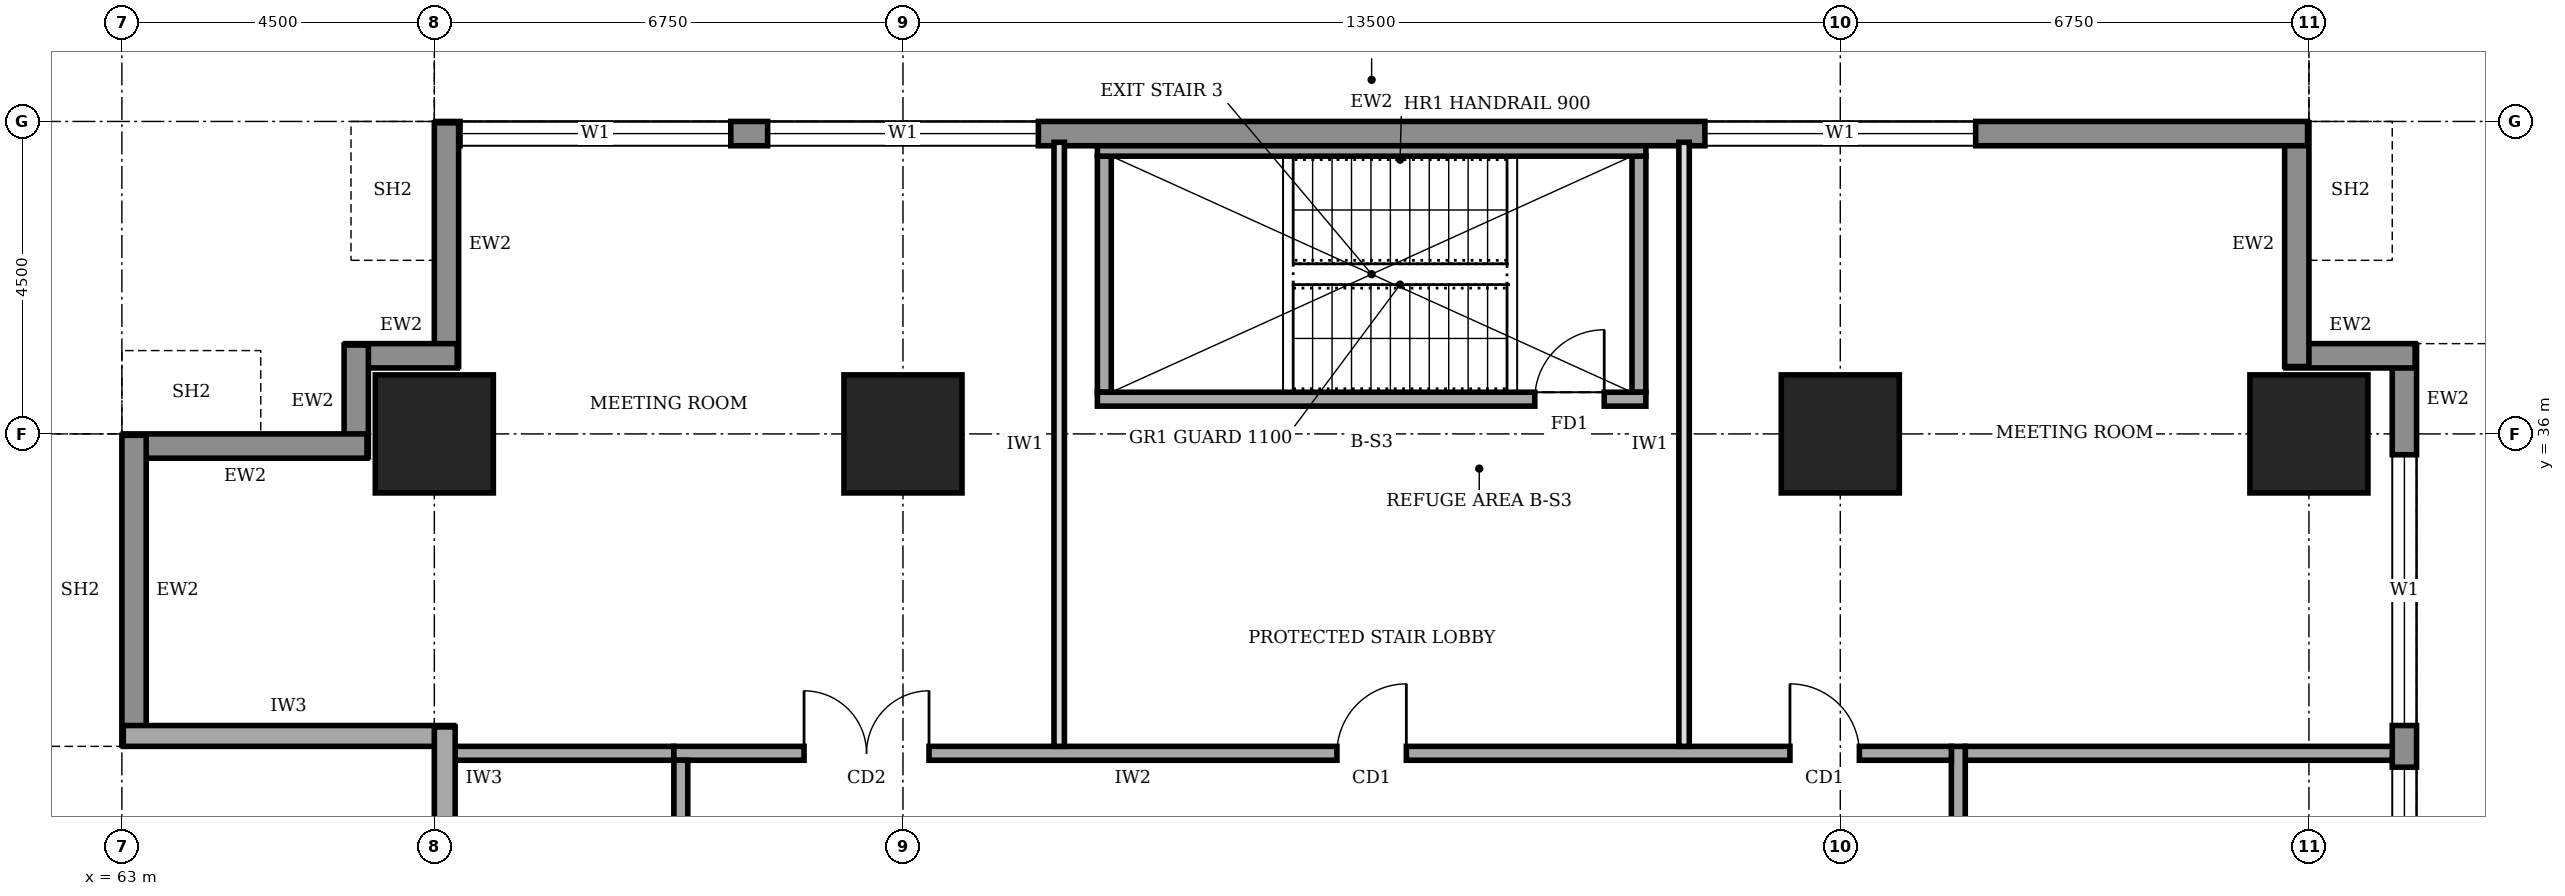
"""IFC4 building model, lengths in metres.
Left out: names, types, materials, properties, quantities, classifications, styles, units other than length and angle.
Written with IfcOpenShell. Run it as: python <this file> out.ifc"""

import sys

from ifc_helpers import new_model, si_unit, direction, frame, frame_2d, origin, origin_2d, place, context, subcontext, project, spatial, rectangle, extrude, element, fill, save


model = new_model("IFC4")
c1 = context("Model", 3, precision=1e-05, world=origin(), true_north=direction((0.0, 1.0)))
c2 = subcontext(c1, "Body", "Model", "MODEL_VIEW")
j1 = project(units=[si_unit("LENGTHUNIT", "METRE"), si_unit("PLANEANGLEUNIT", "RADIAN")], contexts=[c1])
p1 = place(None, origin())
s1 = spatial("IfcSite", under=j1, at=p1, CompositionType="ELEMENT")
p2 = place(p1, origin())
s2 = spatial("IfcBuilding", under=s1, at=p2, CompositionType="ELEMENT")
p3 = place(p2, frame((0.0, 0.0, 117.0)))
s3 = spatial("IfcBuildingStorey", under=s2, at=p3, CompositionType="ELEMENT", Elevation=117.0)
for number, where, z_axis, x_axis in (
    (1, (67.5, 36.0, 0.0), (0.0, 0.0, 1.0), (1.0, 0.0, 0.0)),
    (2, (74.25, 36.0, 0.0), (0.0, 0.0, 1.0), (1.0, 0.0, 0.0)),
    (3, (87.75, 36.0, 0.0), (0.0, 0.0, 1.0), (1.0, 0.0, 0.0)),
    (4, (94.5, 36.0, 0.0), (0.0, 0.0, 1.0), (1.0, 0.0, 0.0)),
):
    element("IfcColumn", number, at=place(p3, frame(where, z_axis=z_axis, x_axis=x_axis)), inside=s3, PredefinedType="COLUMN", context=c2, shape_type="SweptSolid", body=[
        extrude(rectangle(XDim=1.7, YDim=1.7, at=origin_2d()), origin(), (0.0, 0.0, 1.0), 4.0),
    ])
p4 = place(p3, frame((95.875, 3.32, 0.0), z_axis=(0.0, 0.0, 1.0), x_axis=(0.0, 1.0, 0.0)))
e5 = element("IfcWall", 5, at=p4, inside=s3, PredefinedType="STANDARD", context=c2, shape_type="SweptSolid", body=[
    extrude(rectangle(XDim=33.96, YDim=0.35, at=frame_2d((16.98, 0.0))), origin(), (0.0, 0.0, 1.0), 3.75),
])
p5 = place(p4, frame((1.48, 0.0, 0.9)))
e6 = element("IfcOpeningElement", 6, at=p5, cuts=e5, PredefinedType="OPENING", context=c2, shape_type="SweptSolid", body=[
    extrude(rectangle(XDim=3.9, YDim=2.2, at=frame_2d((1.95, 1.1))), frame((0.0, 0.185, 0.0), z_axis=(0.0, -1.0, 0.0), x_axis=(1.0, 0.0, 0.0)), (0.0, 0.0, 1.0), 0.37),
])
p6 = place(p4, frame((5.98, 0.0, 0.9)))
e7 = element("IfcOpeningElement", 7, at=p6, cuts=e5, PredefinedType="OPENING", context=c2, shape_type="SweptSolid", body=[
    extrude(rectangle(XDim=3.9, YDim=2.2, at=frame_2d((1.95, 1.1))), frame((0.0, 0.185, 0.0), z_axis=(0.0, -1.0, 0.0), x_axis=(1.0, 0.0, 0.0)), (0.0, 0.0, 1.0), 0.37),
])
p7 = place(p4, frame((10.48, 0.0, 0.9)))
e8 = element("IfcOpeningElement", 8, at=p7, cuts=e5, PredefinedType="OPENING", context=c2, shape_type="SweptSolid", body=[
    extrude(rectangle(XDim=3.9, YDim=2.2, at=frame_2d((1.95, 1.1))), frame((0.0, 0.185, 0.0), z_axis=(0.0, -1.0, 0.0), x_axis=(1.0, 0.0, 0.0)), (0.0, 0.0, 1.0), 0.37),
])
p8 = place(p4, frame((14.98, 0.0, 0.9)))
e9 = element("IfcOpeningElement", 9, at=p8, cuts=e5, PredefinedType="OPENING", context=c2, shape_type="SweptSolid", body=[
    extrude(rectangle(XDim=3.9, YDim=2.2, at=frame_2d((1.95, 1.1))), frame((0.0, 0.185, 0.0), z_axis=(0.0, -1.0, 0.0), x_axis=(1.0, 0.0, 0.0)), (0.0, 0.0, 1.0), 0.37),
])
p9 = place(p4, frame((19.48, 0.0, 0.9)))
e10 = element("IfcOpeningElement", 10, at=p9, cuts=e5, PredefinedType="OPENING", context=c2, shape_type="SweptSolid", body=[
    extrude(rectangle(XDim=3.9, YDim=2.2, at=frame_2d((1.95, 1.1))), frame((0.0, 0.185, 0.0), z_axis=(0.0, -1.0, 0.0), x_axis=(1.0, 0.0, 0.0)), (0.0, 0.0, 1.0), 0.37),
])
p10 = place(p4, frame((23.98, 0.0, 0.9)))
e11 = element("IfcOpeningElement", 11, at=p10, cuts=e5, PredefinedType="OPENING", context=c2, shape_type="SweptSolid", body=[
    extrude(rectangle(XDim=3.9, YDim=2.2, at=frame_2d((1.95, 1.1))), frame((0.0, 0.185, 0.0), z_axis=(0.0, -1.0, 0.0), x_axis=(1.0, 0.0, 0.0)), (0.0, 0.0, 1.0), 0.37),
])
p11 = place(p4, frame((28.48, 0.0, 0.9)))
e12 = element("IfcOpeningElement", 12, at=p11, cuts=e5, PredefinedType="OPENING", context=c2, shape_type="SweptSolid", body=[
    extrude(rectangle(XDim=3.9, YDim=2.2, at=frame_2d((1.95, 1.1))), frame((0.0, 0.185, 0.0), z_axis=(0.0, -1.0, 0.0), x_axis=(1.0, 0.0, 0.0)), (0.0, 0.0, 1.0), 0.37),
])
p12 = place(p3, frame((96.03, 37.125, 0.0), z_axis=(0.0, 0.0, 1.0), x_axis=(-1.0, 0.0, 0.0)))
e13 = element("IfcWall", 13, at=p12, inside=s3, PredefinedType="STANDARD", context=c2, shape_type="SweptSolid", body=[
    extrude(rectangle(XDim=1.86, YDim=0.35, at=frame_2d((0.93, 0.0))), origin(), (0.0, 0.0, 1.0), 3.75),
])
p13 = place(p3, frame((94.325, 36.97, 0.0), z_axis=(0.0, 0.0, 1.0), x_axis=(0.0, 1.0, 0.0)))
e14 = element("IfcWall", 14, at=p13, inside=s3, PredefinedType="STANDARD", context=c2, shape_type="SweptSolid", body=[
    extrude(rectangle(XDim=3.51, YDim=0.35, at=frame_2d((1.755, 0.0))), origin(), (0.0, 0.0, 1.0), 2.85),
])
p14 = place(p3, frame((94.48, 40.325, 0.0), z_axis=(0.0, 0.0, 1.0), x_axis=(-1.0, 0.0, 0.0)))
e15 = element("IfcWall", 15, at=p14, inside=s3, PredefinedType="STANDARD", context=c2, shape_type="SweptSolid", body=[
    extrude(rectangle(XDim=26.96, YDim=0.35, at=frame_2d((13.48, 0.0))), origin(), (0.0, 0.0, 1.0), 3.75),
])
p15 = place(p14, frame((22.71, 0.0, 0.9)))
e16 = element("IfcOpeningElement", 16, at=p15, cuts=e15, PredefinedType="OPENING", context=c2, shape_type="SweptSolid", body=[
    extrude(rectangle(XDim=3.9, YDim=2.2, at=frame_2d((1.95, 1.1))), frame((0.0, 0.185, 0.0), z_axis=(0.0, -1.0, 0.0), x_axis=(1.0, 0.0, 0.0)), (0.0, 0.0, 1.0), 0.37),
])
p16 = place(p14, frame((18.28, 0.0, 0.9)))
e17 = element("IfcOpeningElement", 17, at=p16, cuts=e15, PredefinedType="OPENING", context=c2, shape_type="SweptSolid", body=[
    extrude(rectangle(XDim=3.9, YDim=2.2, at=frame_2d((1.95, 1.1))), frame((0.0, 0.185, 0.0), z_axis=(0.0, -1.0, 0.0), x_axis=(1.0, 0.0, 0.0)), (0.0, 0.0, 1.0), 0.37),
])
p17 = place(p14, frame((4.78, 0.0, 0.9)))
e18 = element("IfcOpeningElement", 18, at=p17, cuts=e15, PredefinedType="OPENING", context=c2, shape_type="SweptSolid", body=[
    extrude(rectangle(XDim=3.9, YDim=2.2, at=frame_2d((1.95, 1.1))), frame((0.0, 0.185, 0.0), z_axis=(0.0, -1.0, 0.0), x_axis=(1.0, 0.0, 0.0)), (0.0, 0.0, 1.0), 0.37),
])
p18 = place(p3, frame((67.675, 40.48, 0.0), z_axis=(0.0, 0.0, 1.0), x_axis=(0.0, -1.0, 0.0)))
e19 = element("IfcWall", 19, at=p18, inside=s3, PredefinedType="STANDARD", context=c2, shape_type="SweptSolid", body=[
    extrude(rectangle(XDim=3.51, YDim=0.35, at=frame_2d((1.755, 0.0))), origin(), (0.0, 0.0, 1.0), 2.85),
])
for number, where, z_axis, x_axis in (
    (20, (67.83, 37.125, 0.0), (0.0, 0.0, 1.0), (-1.0, 0.0, 0.0)),
    (21, (66.375, 37.28, 0.0), (0.0, 0.0, 1.0), (0.0, -1.0, 0.0)),
):
    element("IfcWall", number, at=place(p3, frame(where, z_axis=z_axis, x_axis=x_axis)), inside=s3, PredefinedType="STANDARD", context=c2, shape_type="SweptSolid", body=[
        extrude(rectangle(XDim=1.61, YDim=0.35, at=frame_2d((0.805, 0.0))), origin(), (0.0, 0.0, 1.0), 3.75),
    ])
p19 = place(p3, frame((66.53, 35.825, 0.0), z_axis=(0.0, 0.0, 1.0), x_axis=(-1.0, 0.0, 0.0)))
e22 = element("IfcWall", 22, at=p19, inside=s3, PredefinedType="STANDARD", context=c2, shape_type="SweptSolid", body=[
    extrude(rectangle(XDim=3.51, YDim=0.35, at=frame_2d((1.755, 0.0))), origin(), (0.0, 0.0, 1.0), 2.85),
])
p20 = place(p3, frame((63.175, 35.98, 0.0), z_axis=(0.0, 0.0, 1.0), x_axis=(0.0, -1.0, 0.0)))
e23 = element("IfcWall", 23, at=p20, inside=s3, PredefinedType="STANDARD", context=c2, shape_type="SweptSolid", body=[
    extrude(rectangle(XDim=4.46, YDim=0.35, at=frame_2d((2.23, 0.0))), origin(), (0.0, 0.0, 1.0), 3.75),
])
p21 = place(p3, frame((63.02, 31.65, 0.0), z_axis=(0.0, 0.0, 1.0), x_axis=(1.0, 0.0, 0.0)))
e24 = element("IfcWall", 24, at=p21, inside=s3, PredefinedType="SOLIDWALL", context=c2, shape_type="SweptSolid", body=[
    extrude(rectangle(XDim=4.76, YDim=0.3, at=frame_2d((2.38, 0.0))), origin(), (0.0, 0.0, 1.0), 3.75),
])
p22 = place(p3, frame((67.65, 31.78, 0.0), z_axis=(0.0, 0.0, 1.0), x_axis=(0.0, -1.0, 0.0)))
e25 = element("IfcWall", 25, at=p22, inside=s3, PredefinedType="SOLIDWALL", context=c2, shape_type="SweptSolid", body=[
    extrude(rectangle(XDim=1.48, YDim=0.3, at=frame_2d((0.74, 0.0))), origin(), (0.0, 0.0, 1.0), 2.65),
])
p23 = place(p3, frame((89.45, 9.2, 0.0), z_axis=(0.0, 0.0, 1.0), x_axis=(0.0, 1.0, 0.0)))
e26 = element("IfcWall", 26, at=p23, inside=s3, PredefinedType="SOLIDWALL", context=c2, shape_type="SweptSolid", body=[
    extrude(rectangle(XDim=22.3, YDim=0.2, at=frame_2d((11.15, 0.0))), origin(), (0.0, 0.0, 1.0), 3.75),
])
p24 = place(p23, frame((1.625, 0.0, 0.0)))
e27 = element("IfcOpeningElement", 27, at=p24, cuts=e26, PredefinedType="OPENING", context=c2, shape_type="SweptSolid", body=[
    extrude(rectangle(XDim=1.0, YDim=2.1, at=frame_2d((0.5, 1.05))), frame((0.0, 0.11, 0.0), z_axis=(0.0, -1.0, 0.0), x_axis=(1.0, 0.0, 0.0)), (0.0, 0.0, 1.0), 0.22),
])
p25 = place(p23, frame((5.05, 0.0, 0.0)))
e28 = element("IfcOpeningElement", 28, at=p25, cuts=e26, PredefinedType="OPENING", context=c2, shape_type="SweptSolid", body=[
    extrude(rectangle(XDim=1.0, YDim=2.1, at=frame_2d((0.5, 1.05))), frame((0.0, 0.11, 0.0), z_axis=(0.0, -1.0, 0.0), x_axis=(1.0, 0.0, 0.0)), (0.0, 0.0, 1.0), 0.22),
])
p26 = place(p23, frame((8.075, 0.0, 0.0)))
e29 = element("IfcOpeningElement", 29, at=p26, cuts=e26, PredefinedType="OPENING", context=c2, shape_type="SweptSolid", body=[
    extrude(rectangle(XDim=0.9, YDim=2.1, at=frame_2d((0.45, 1.05))), frame((0.0, 0.11, 0.0), z_axis=(0.0, -1.0, 0.0), x_axis=(1.0, 0.0, 0.0)), (0.0, 0.0, 1.0), 0.22),
])
p27 = place(p23, frame((11.05, 0.0, 0.0)))
e30 = element("IfcOpeningElement", 30, at=p27, cuts=e26, PredefinedType="OPENING", context=c2, shape_type="SweptSolid", body=[
    extrude(rectangle(XDim=0.9, YDim=2.1, at=frame_2d((0.45, 1.05))), frame((0.0, 0.11, 0.0), z_axis=(0.0, -1.0, 0.0), x_axis=(1.0, 0.0, 0.0)), (0.0, 0.0, 1.0), 0.22),
])
p28 = place(p23, frame((15.675, 0.0, 0.0)))
e31 = element("IfcOpeningElement", 31, at=p28, cuts=e26, PredefinedType="OPENING", context=c2, shape_type="SweptSolid", body=[
    extrude(rectangle(XDim=0.9, YDim=2.1, at=frame_2d((0.45, 1.05))), frame((0.0, 0.11, 0.0), z_axis=(0.0, -1.0, 0.0), x_axis=(1.0, 0.0, 0.0)), (0.0, 0.0, 1.0), 0.22),
])
p29 = place(p23, frame((13.1, 0.0, 0.0)))
e32 = element("IfcOpeningElement", 32, at=p29, cuts=e26, PredefinedType="OPENING", context=c2, shape_type="SweptSolid", body=[
    extrude(rectangle(XDim=1.0, YDim=2.1, at=frame_2d((0.5, 1.05))), frame((0.0, 0.11, 0.0), z_axis=(0.0, -1.0, 0.0), x_axis=(1.0, 0.0, 0.0)), (0.0, 0.0, 1.0), 0.22),
])
p30 = place(p23, frame((19.475, 0.0, 0.0)))
e33 = element("IfcOpeningElement", 33, at=p30, cuts=e26, PredefinedType="OPENING", context=c2, shape_type="SweptSolid", body=[
    extrude(rectangle(XDim=1.0, YDim=2.1, at=frame_2d((0.5, 1.05))), frame((0.0, 0.11, 0.0), z_axis=(0.0, -1.0, 0.0), x_axis=(1.0, 0.0, 0.0)), (0.0, 0.0, 1.0), 0.22),
])
p31 = place(p3, frame((89.35, 31.4, 0.0), z_axis=(0.0, 0.0, 1.0), x_axis=(-1.0, 0.0, 0.0)))
e34 = element("IfcWall", 34, at=p31, inside=s3, PredefinedType="SOLIDWALL", context=c2, shape_type="SweptSolid", body=[
    extrude(rectangle(XDim=18.4, YDim=0.2, at=frame_2d((9.2, 0.0))), origin(), (0.0, 0.0, 1.0), 3.75),
])
p32 = place(p31, frame((14.725, 0.0, 0.0)))
e35 = element("IfcOpeningElement", 35, at=p32, cuts=e34, PredefinedType="OPENING", context=c2, shape_type="SweptSolid", body=[
    extrude(rectangle(XDim=1.8, YDim=2.1, at=frame_2d((0.9, 1.05))), frame((0.0, 0.11, 0.0), z_axis=(0.0, -1.0, 0.0), x_axis=(1.0, 0.0, 0.0)), (0.0, 0.0, 1.0), 0.22),
])
p33 = place(p31, frame((7.85, 0.0, 0.0)))
e36 = element("IfcOpeningElement", 36, at=p33, cuts=e34, PredefinedType="OPENING", context=c2, shape_type="SweptSolid", body=[
    extrude(rectangle(XDim=1.0, YDim=2.1, at=frame_2d((0.5, 1.05))), frame((0.0, 0.11, 0.0), z_axis=(0.0, -1.0, 0.0), x_axis=(1.0, 0.0, 0.0)), (0.0, 0.0, 1.0), 0.22),
])
p34 = place(p31, frame((1.325, 0.0, 0.0)))
e37 = element("IfcOpeningElement", 37, at=p34, cuts=e34, PredefinedType="OPENING", context=c2, shape_type="SweptSolid", body=[
    extrude(rectangle(XDim=1.0, YDim=2.1, at=frame_2d((0.5, 1.05))), frame((0.0, 0.11, 0.0), z_axis=(0.0, -1.0, 0.0), x_axis=(1.0, 0.0, 0.0)), (0.0, 0.0, 1.0), 0.22),
])
p35 = place(p3, frame((71.05, 31.3, 0.0), z_axis=(0.0, 0.0, 1.0), x_axis=(0.0, -1.0, 0.0)))
e38 = element("IfcWall", 38, at=p35, inside=s3, PredefinedType="SOLIDWALL", context=c2, shape_type="SweptSolid", body=[
    extrude(rectangle(XDim=22.3, YDim=0.2, at=frame_2d((11.15, 0.0))), origin(), (0.0, 0.0, 1.0), 3.75),
])
p36 = place(p35, frame((10.15, 0.0, 0.0)))
e39 = element("IfcOpeningElement", 39, at=p36, cuts=e38, PredefinedType="OPENING", context=c2, shape_type="SweptSolid", body=[
    extrude(rectangle(XDim=1.8, YDim=2.1, at=frame_2d((0.9, 1.05))), frame((0.0, 0.11, 0.0), z_axis=(0.0, -1.0, 0.0), x_axis=(1.0, 0.0, 0.0)), (0.0, 0.0, 1.0), 0.22),
])
p37 = place(p3, frame((67.8, 31.4, 0.0), z_axis=(0.0, 0.0, 1.0), x_axis=(1.0, 0.0, 0.0)))
e40 = element("IfcWall", 40, at=p37, inside=s3, PredefinedType="SOLIDWALL", context=c2, shape_type="SweptSolid", body=[
    extrude(rectangle(XDim=3.15, YDim=0.2, at=frame_2d((1.575, 0.0))), origin(), (0.0, 0.0, 1.0), 3.75),
])
p38 = place(p3, frame((89.55, 31.4, 0.0), z_axis=(0.0, 0.0, 1.0), x_axis=(1.0, 0.0, 0.0)))
e41 = element("IfcWall", 41, at=p38, inside=s3, PredefinedType="SOLIDWALL", context=c2, shape_type="SweptSolid", body=[
    extrude(rectangle(XDim=6.2, YDim=0.2, at=frame_2d((3.1, 0.0))), origin(), (0.0, 0.0, 1.0), 3.75),
])
for number, where, z_axis, x_axis in (
    (42, (76.5, 31.5, 0.0), (0.0, 0.0, 1.0), (0.0, 1.0, 0.0)),
    (43, (85.5, 31.5, 0.0), (0.0, 0.0, 1.0), (0.0, 1.0, 0.0)),
):
    element("IfcWall", number, at=place(p3, frame(where, z_axis=z_axis, x_axis=x_axis)), inside=s3, PredefinedType="PARTITIONING", context=c2, shape_type="SweptSolid", body=[
        extrude(rectangle(XDim=8.7, YDim=0.15, at=frame_2d((4.35, 0.0))), origin(), (0.0, 0.0, 1.0), 3.75),
    ])
p39 = place(p3, frame((77.05, 36.5, 0.0), z_axis=(0.0, 0.0, 1.0), x_axis=(1.0, 0.0, 0.0)))
e44 = element("IfcWall", 44, at=p39, inside=s3, PredefinedType="SOLIDWALL", context=c2, shape_type="SweptSolid", body=[
    extrude(rectangle(XDim=7.9, YDim=0.2, at=frame_2d((3.95, 0.0))), origin(), (0.0, 0.0, 1.0), 3.75),
])
p40 = place(p39, frame((6.3, 0.0, 0.0)))
e45 = element("IfcOpeningElement", 45, at=p40, cuts=e44, PredefinedType="OPENING", context=c2, shape_type="SweptSolid", body=[
    extrude(rectangle(XDim=1.0, YDim=2.1, at=frame_2d((0.5, 1.05))), frame((0.0, 0.11, 0.0), z_axis=(0.0, -1.0, 0.0), x_axis=(1.0, 0.0, 0.0)), (0.0, 0.0, 1.0), 0.22),
])
p41 = place(p3, frame((77.05, 40.075, 0.0), z_axis=(0.0, 0.0, 1.0), x_axis=(1.0, 0.0, 0.0)))
e46 = element("IfcWall", 46, at=p41, inside=s3, PredefinedType="SOLIDWALL", context=c2, shape_type="SweptSolid", body=[
    extrude(rectangle(XDim=7.9, YDim=0.15, at=frame_2d((3.95, 0.0))), origin(), (0.0, 0.0, 1.0), 3.75),
])
for number, where, z_axis, x_axis in (
    (47, (77.15, 36.6, 0.0), (0.0, 0.0, 1.0), (0.0, 1.0, 0.0)),
    (48, (84.85, 36.6, 0.0), (0.0, 0.0, 1.0), (0.0, 1.0, 0.0)),
):
    element("IfcWall", number, at=place(p3, frame(where, z_axis=z_axis, x_axis=x_axis)), inside=s3, PredefinedType="SOLIDWALL", context=c2, shape_type="SweptSolid", body=[
        extrude(rectangle(XDim=3.4, YDim=0.2, at=frame_2d((1.7, 0.0))), origin(), (0.0, 0.0, 1.0), 3.75),
    ])
p42 = place(p10, origin())
e49 = element("IfcWindow", 49, at=p42, inside=s3, PartitioningType="SINGLE_PANEL", PredefinedType="WINDOW", context=c2, shape_type="SweptSolid", body=[
    extrude(rectangle(XDim=3.9, YDim=2.2, at=frame_2d((1.95, 1.1))), frame((0.0, 0.03, 0.0), z_axis=(0.0, -1.0, 0.0), x_axis=(1.0, 0.0, 0.0)), (0.0, 0.0, 1.0), 0.06),
])
fill(e11, e49)
p43 = place(p11, origin())
e50 = element("IfcWindow", 50, at=p43, inside=s3, PartitioningType="SINGLE_PANEL", PredefinedType="WINDOW", context=c2, shape_type="SweptSolid", body=[
    extrude(rectangle(XDim=3.9, YDim=2.2, at=frame_2d((1.95, 1.1))), frame((0.0, 0.03, 0.0), z_axis=(0.0, -1.0, 0.0), x_axis=(1.0, 0.0, 0.0)), (0.0, 0.0, 1.0), 0.06),
])
fill(e12, e50)
p44 = place(p15, origin())
e51 = element("IfcWindow", 51, at=p44, inside=s3, PartitioningType="SINGLE_PANEL", PredefinedType="WINDOW", context=c2, shape_type="SweptSolid", body=[
    extrude(rectangle(XDim=3.9, YDim=2.2, at=frame_2d((1.95, 1.1))), frame((0.0, 0.03, 0.0), z_axis=(0.0, -1.0, 0.0), x_axis=(1.0, 0.0, 0.0)), (0.0, 0.0, 1.0), 0.06),
])
fill(e16, e51)
p45 = place(p16, origin())
e52 = element("IfcWindow", 52, at=p45, inside=s3, PartitioningType="SINGLE_PANEL", PredefinedType="WINDOW", context=c2, shape_type="SweptSolid", body=[
    extrude(rectangle(XDim=3.9, YDim=2.2, at=frame_2d((1.95, 1.1))), frame((0.0, 0.03, 0.0), z_axis=(0.0, -1.0, 0.0), x_axis=(1.0, 0.0, 0.0)), (0.0, 0.0, 1.0), 0.06),
])
fill(e17, e52)
p46 = place(p17, origin())
e53 = element("IfcWindow", 53, at=p46, inside=s3, PartitioningType="SINGLE_PANEL", PredefinedType="WINDOW", context=c2, shape_type="SweptSolid", body=[
    extrude(rectangle(XDim=3.9, YDim=2.2, at=frame_2d((1.95, 1.1))), frame((0.0, 0.03, 0.0), z_axis=(0.0, -1.0, 0.0), x_axis=(1.0, 0.0, 0.0)), (0.0, 0.0, 1.0), 0.06),
])
fill(e18, e53)
p47 = place(p32, frame((1.8, 0.0, 0.0), z_axis=(0.0, 0.0, 1.0), x_axis=(-1.0, 0.0, 0.0)))
e54 = element("IfcDoor", 54, at=p47, inside=s3, OperationType="DOUBLE_DOOR_SINGLE_SWING", PredefinedType="DOOR", context=c2, shape_type="SweptSolid", body=[
    extrude(rectangle(XDim=1.8, YDim=2.1, at=frame_2d((0.9, 1.05))), frame((0.0, 0.025, 0.0), z_axis=(0.0, -1.0, 0.0), x_axis=(1.0, 0.0, 0.0)), (0.0, 0.0, 1.0), 0.05),
])
fill(e35, e54)
p48 = place(p33, frame((1.0, 0.0, 0.0), z_axis=(0.0, 0.0, 1.0), x_axis=(-1.0, 0.0, 0.0)))
e55 = element("IfcDoor", 55, at=p48, inside=s3, OperationType="SINGLE_SWING_RIGHT", PredefinedType="DOOR", context=c2, shape_type="SweptSolid", body=[
    extrude(rectangle(XDim=1.0, YDim=2.1, at=frame_2d((0.5, 1.05))), frame((0.0, 0.025, 0.0), z_axis=(0.0, -1.0, 0.0), x_axis=(1.0, 0.0, 0.0)), (0.0, 0.0, 1.0), 0.05),
])
fill(e36, e55)
p49 = place(p34, frame((1.0, 0.0, 0.0), z_axis=(0.0, 0.0, 1.0), x_axis=(-1.0, 0.0, 0.0)))
e56 = element("IfcDoor", 56, at=p49, inside=s3, OperationType="SINGLE_SWING_LEFT", PredefinedType="DOOR", context=c2, shape_type="SweptSolid", body=[
    extrude(rectangle(XDim=1.0, YDim=2.1, at=frame_2d((0.5, 1.05))), frame((0.0, 0.025, 0.0), z_axis=(0.0, -1.0, 0.0), x_axis=(1.0, 0.0, 0.0)), (0.0, 0.0, 1.0), 0.05),
])
fill(e37, e56)
p50 = place(p40, origin())
e57 = element("IfcDoor", 57, at=p50, inside=s3, OperationType="SINGLE_SWING_RIGHT", PredefinedType="DOOR", context=c2, shape_type="SweptSolid", body=[
    extrude(rectangle(XDim=1.0, YDim=2.1, at=frame_2d((0.5, 1.05))), frame((0.0, 0.025, 0.0), z_axis=(0.0, -1.0, 0.0), x_axis=(1.0, 0.0, 0.0)), (0.0, 0.0, 1.0), 0.05),
])
fill(e45, e57)
save(model, sys.argv[1])
